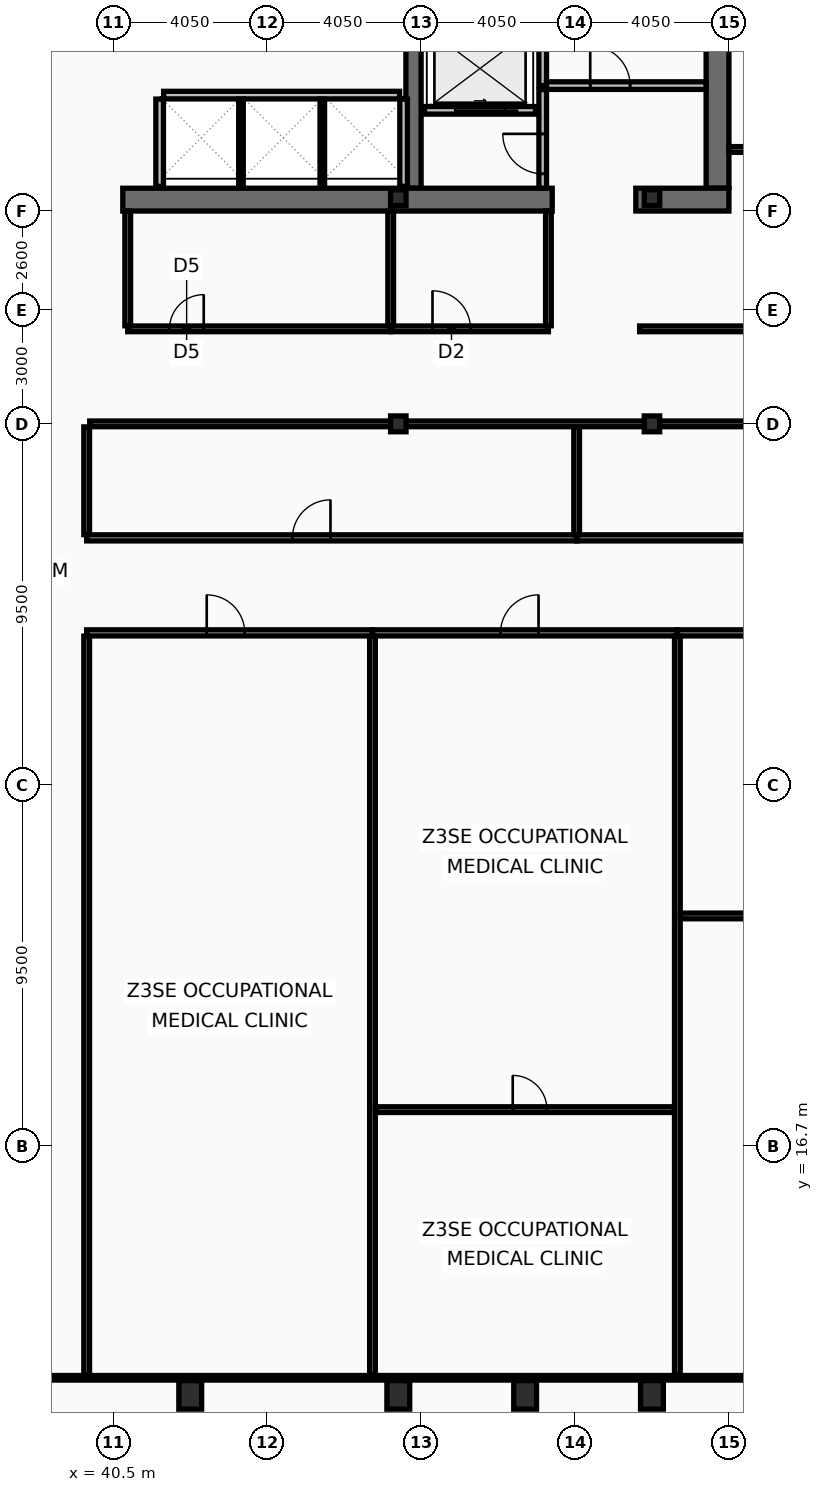
"""IFC4 building model, lengths in metres.
Left out: names, types, materials, properties, quantities, classifications, styles, units other than length and angle.
Written with IfcOpenShell. Run it as: python <this file> out.ifc"""

import sys

from ifc_helpers import new_model, si_unit, direction, frame, frame_2d, origin, origin_2d, place, context, subcontext, project, spatial, rectangle, hollow_rectangle, i_section, extrude, element, fill, save


model = new_model("IFC4")
c1 = context("Model", 3, precision=1e-05, world=origin(), true_north=direction((0.0, 1.0)))
c2 = subcontext(c1, "Body", "Model", "MODEL_VIEW")
j1 = project(units=[si_unit("LENGTHUNIT", "METRE"), si_unit("PLANEANGLEUNIT", "RADIAN")], contexts=[c1])
p1 = place(None, origin())
s1 = spatial("IfcSite", under=j1, at=p1, CompositionType="ELEMENT")
p2 = place(p1, origin())
s2 = spatial("IfcBuilding", under=s1, at=p2, CompositionType="ELEMENT")
p3 = place(p2, frame((0.0, 0.0, 221.0)))
s3 = spatial("IfcBuildingStorey", under=s2, at=p3, CompositionType="ELEMENT", Elevation=221.0)
p4 = place(p3, frame((56.4, 53.1, 0.0), z_axis=(0.0, 0.0, 1.0), x_axis=(0.0, -1.0, 0.0)))
e1 = element("IfcWall", 1, at=p4, inside=s3, PredefinedType="SHEAR", context=c2, shape_type="SweptSolid", body=[
    extrude(rectangle(XDim=11.2, YDim=0.6, at=frame_2d((5.6, 0.0))), origin(), (0.0, 0.0, 1.0), 3.44),
])
p5 = place(p3, frame((48.4, 41.9, 0.0), z_axis=(0.0, 0.0, 1.0), x_axis=(0.0, 1.0, 0.0)))
e2 = element("IfcWall", 2, at=p5, inside=s3, PredefinedType="SHEAR", context=c2, shape_type="SweptSolid", body=[
    extrude(rectangle(XDim=11.2, YDim=0.4, at=frame_2d((5.6, 0.0))), origin(), (0.0, 0.0, 1.0), 3.44),
])
p6 = place(p3, frame((52.05, 41.6, 0.0), z_axis=(0.0, 0.0, 1.0), x_axis=(-1.0, 0.0, 0.0)))
e3 = element("IfcWall", 3, at=p6, inside=s3, PredefinedType="SHEAR", context=c2, shape_type="SweptSolid", body=[
    extrude(rectangle(XDim=11.3, YDim=0.6, at=frame_2d((5.65, 0.0))), origin(), (0.0, 0.0, 1.0), 3.44),
])
p7 = place(p3, frame((56.7, 41.6, 0.0), z_axis=(0.0, 0.0, 1.0), x_axis=(-1.0, 0.0, 0.0)))
e4 = element("IfcWall", 4, at=p7, inside=s3, PredefinedType="SHEAR", context=c2, shape_type="SweptSolid", body=[
    extrude(rectangle(XDim=2.45, YDim=0.6, at=frame_2d((1.225, 0.0))), origin(), (0.0, 0.0, 1.0), 3.44),
])
for number, where, z_axis, x_axis in (
    (5, (42.525, 10.15, 0.0), (0.0, 0.0, 1.0), (1.0, 0.0, 0.0)),
    (6, (48.0, 10.15, 0.0), (0.0, 0.0, 1.0), (1.0, 0.0, 0.0)),
    (7, (51.337, 10.15, 0.0), (0.0, 0.0, 1.0), (1.0, 0.0, 0.0)),
    (8, (54.675, 10.15, 0.0), (0.0, 0.0, 1.0), (1.0, 0.0, 0.0)),
):
    element("IfcColumn", number, at=place(p3, frame(where, z_axis=z_axis, x_axis=x_axis)), inside=s3, PredefinedType="COLUMN", context=c2, shape_type="SweptSolid", body=[
        extrude(hollow_rectangle(XDim=0.6, YDim=0.75, WallThickness=0.045, at=origin_2d()), origin(), (0.0, 0.0, 1.0), 3.6),
    ])
for number, where, z_axis, x_axis in (
    (9, (48.0, 35.7, 0.0), (0.0, 0.0, 1.0), (1.0, 0.0, 0.0)),
    (10, (48.0, 41.65, 0.0), (0.0, 0.0, 1.0), (1.0, 0.0, 0.0)),
    (11, (54.675, 35.7, 0.0), (0.0, 0.0, 1.0), (1.0, 0.0, 0.0)),
    (12, (54.675, 41.65, 0.0), (0.0, 0.0, 1.0), (1.0, 0.0, 0.0)),
):
    element("IfcColumn", number, at=place(p3, frame(where, z_axis=z_axis, x_axis=x_axis)), inside=s3, PredefinedType="COLUMN", context=c2, shape_type="SweptSolid", body=[
        extrude(i_section(OverallWidth=0.406, OverallDepth=0.416, WebThickness=0.03, FlangeThickness=0.048, at=origin_2d()), origin(), (0.0, 0.0, 1.0), 3.6),
    ])
p8 = place(p3, frame((51.61, 43.95, 0.0), z_axis=(0.0, 0.0, 1.0), x_axis=(-1.0, 0.0, 0.0)))
e13 = element("IfcWall", 13, at=p8, inside=s3, PredefinedType="PARTITIONING", context=c2, shape_type="SweptSolid", body=[
    extrude(rectangle(XDim=2.92, YDim=0.2, at=frame_2d((1.46, 0.0))), origin(), (0.0, 0.0, 1.0), 3.44),
])
p9 = place(p8, frame((0.81, 0.0, 0.0)))
e14 = element("IfcOpeningElement", 14, at=p9, cuts=e13, PredefinedType="OPENING", context=c2, shape_type="SweptSolid", body=[
    extrude(rectangle(XDim=1.3, YDim=2.18, at=frame_2d((0.65, 1.09))), frame((0.0, 0.11, 0.0), z_axis=(0.0, -1.0, 0.0), x_axis=(1.0, 0.0, 0.0)), (0.0, 0.0, 1.0), 0.22),
])
p10 = place(p3, frame((51.8, 44.6, 0.0), z_axis=(0.0, 0.0, 1.0), x_axis=(0.0, 1.0, 0.0)))
e15 = element("IfcWall", 15, at=p10, inside=s3, PredefinedType="PARTITIONING", context=c2, shape_type="SweptSolid", body=[
    extrude(rectangle(XDim=4.3, YDim=0.2, at=frame_2d((2.15, 0.0))), origin(), (0.0, 0.0, 1.0), 3.44),
])
p11 = place(p3, frame((51.9, 44.6, 0.0), z_axis=(0.0, 0.0, 1.0), x_axis=(1.0, 0.0, 0.0)))
e16 = element("IfcWall", 16, at=p11, inside=s3, PredefinedType="PARTITIONING", context=c2, shape_type="SweptSolid", body=[
    extrude(rectangle(XDim=4.2, YDim=0.2, at=frame_2d((2.1, 0.0))), origin(), (0.0, 0.0, 1.0), 3.44),
])
p12 = place(p11, frame((1.15, 0.0, 0.0)))
e17 = element("IfcOpeningElement", 17, at=p12, cuts=e16, PredefinedType="OPENING", context=c2, shape_type="SweptSolid", body=[
    extrude(rectangle(XDim=1.05, YDim=2.15, at=frame_2d((0.525, 1.075))), frame((0.0, 0.11, 0.0), z_axis=(0.0, -1.0, 0.0), x_axis=(1.0, 0.0, 0.0)), (0.0, 0.0, 1.0), 0.22),
])
p13 = place(p3, frame((51.8, 41.9, 0.0), z_axis=(0.0, 0.0, 1.0), x_axis=(0.0, 1.0, 0.0)))
e18 = element("IfcWall", 18, at=p13, inside=s3, PredefinedType="PARTITIONING", context=c2, shape_type="SweptSolid", body=[
    extrude(rectangle(XDim=2.595, YDim=0.2, at=frame_2d((1.298, 0.0))), origin(), (0.0, 0.0, 1.0), 3.44),
])
p14 = place(p13, frame((0.38, 0.0, 0.0)))
e19 = element("IfcOpeningElement", 19, at=p14, cuts=e18, PredefinedType="OPENING", context=c2, shape_type="SweptSolid", body=[
    extrude(rectangle(XDim=1.05, YDim=2.15, at=frame_2d((0.525, 1.075))), frame((0.0, 0.11, 0.0), z_axis=(0.0, -1.0, 0.0), x_axis=(1.0, 0.0, 0.0)), (0.0, 0.0, 1.0), 0.22),
])
p15 = place(p3, frame((41.825, 44.35, 0.0), z_axis=(0.0, 0.0, 1.0), x_axis=(1.0, 0.0, 0.0)))
e20 = element("IfcWall", 20, at=p15, inside=s3, PredefinedType="PARTITIONING", context=c2, shape_type="SweptSolid", body=[
    extrude(rectangle(XDim=6.21, YDim=0.2, at=frame_2d((3.105, 0.0))), origin(), (0.0, 0.0, 1.0), 3.44),
])
for number, where, z_axis, x_axis in (
    (21, (41.72, 41.95, 0.0), (0.0, 0.0, 1.0), (0.0, 1.0, 0.0)),
    (22, (48.14, 41.95, 0.0), (0.0, 0.0, 1.0), (0.0, 1.0, 0.0)),
):
    element("IfcWall", number, at=place(p3, frame(where, z_axis=z_axis, x_axis=x_axis)), inside=s3, PredefinedType="PARTITIONING", context=c2, shape_type="SweptSolid", body=[
        extrude(rectangle(XDim=2.295, YDim=0.2, at=frame_2d((1.147, 0.0))), origin(), (0.0, 0.0, 1.0), 3.44),
    ])
for number, where, z_axis, x_axis in (
    (23, (43.86, 41.95, 0.0), (0.0, 0.0, 1.0), (0.0, 1.0, 0.0)),
    (24, (46.0, 41.95, 0.0), (0.0, 0.0, 1.0), (0.0, 1.0, 0.0)),
):
    element("IfcWall", number, at=place(p3, frame(where, z_axis=z_axis, x_axis=x_axis)), inside=s3, PredefinedType="PARTITIONING", context=c2, shape_type="SweptSolid", body=[
        extrude(rectangle(XDim=2.295, YDim=0.12, at=frame_2d((1.147, 0.0))), origin(), (0.0, 0.0, 1.0), 3.44),
    ])
p16 = place(p3, frame((40.88, 38.2, 0.0), z_axis=(0.0, 0.0, 1.0), x_axis=(1.0, 0.0, 0.0)))
e25 = element("IfcWall", 25, at=p16, inside=s3, PredefinedType="PARTITIONING", context=c2, shape_type="SweptSolid", body=[
    extrude(rectangle(XDim=6.92, YDim=0.15, at=frame_2d((3.46, 0.0))), origin(), (0.0, 0.0, 1.0), 2.78),
])
p17 = place(p16, frame((1.1, 0.0, 0.0)))
e26 = element("IfcOpeningElement", 26, at=p17, cuts=e25, PredefinedType="OPENING", context=c2, shape_type="SweptSolid", body=[
    extrude(rectangle(XDim=0.9, YDim=2.05, at=frame_2d((0.45, 1.025))), frame((0.0, 0.085, 0.0), z_axis=(0.0, -1.0, 0.0), x_axis=(1.0, 0.0, 0.0)), (0.0, 0.0, 1.0), 0.17),
])
p18 = place(p3, frame((47.8, 38.2, 0.0), z_axis=(0.0, 0.0, 1.0), x_axis=(1.0, 0.0, 0.0)))
e27 = element("IfcWall", 27, at=p18, inside=s3, PredefinedType="PARTITIONING", context=c2, shape_type="SweptSolid", body=[
    extrude(rectangle(XDim=4.15, YDim=0.15, at=frame_2d((2.075, 0.0))), origin(), (0.0, 0.0, 1.0), 2.78),
])
p19 = place(p18, frame((1.1, 0.0, 0.0)))
e28 = element("IfcOpeningElement", 28, at=p19, cuts=e27, PredefinedType="OPENING", context=c2, shape_type="SweptSolid", body=[
    extrude(rectangle(XDim=1.0, YDim=2.05, at=frame_2d((0.5, 1.025))), frame((0.0, 0.085, 0.0), z_axis=(0.0, -1.0, 0.0), x_axis=(1.0, 0.0, 0.0)), (0.0, 0.0, 1.0), 0.17),
])
p20 = place(p3, frame((40.88, 38.28, 0.0), z_axis=(0.0, 0.0, 1.0), x_axis=(0.0, 1.0, 0.0)))
e29 = element("IfcWall", 29, at=p20, inside=s3, PredefinedType="PARTITIONING", context=c2, shape_type="SweptSolid", body=[
    extrude(rectangle(XDim=3.02, YDim=0.15, at=frame_2d((1.51, 0.0))), origin(), (0.0, 0.0, 1.0), 3.44),
])
p21 = place(p3, frame((47.8, 38.28, 0.0), z_axis=(0.0, 0.0, 1.0), x_axis=(0.0, 1.0, 0.0)))
e30 = element("IfcWall", 30, at=p21, inside=s3, PredefinedType="PARTITIONING", context=c2, shape_type="SweptSolid", body=[
    extrude(rectangle(XDim=3.02, YDim=0.15, at=frame_2d((1.51, 0.0))), origin(), (0.0, 0.0, 1.0), 2.78),
])
p22 = place(p3, frame((51.95, 38.28, 0.0), z_axis=(0.0, 0.0, 1.0), x_axis=(0.0, 1.0, 0.0)))
e31 = element("IfcWall", 31, at=p22, inside=s3, PredefinedType="PARTITIONING", context=c2, shape_type="SweptSolid", body=[
    extrude(rectangle(XDim=3.02, YDim=0.15, at=frame_2d((1.51, 0.0))), origin(), (0.0, 0.0, 1.0), 3.44),
])
p23 = place(p3, frame((54.35, 38.2, 0.0), z_axis=(0.0, 0.0, 1.0), x_axis=(1.0, 0.0, 0.0)))
e32 = element("IfcWall", 32, at=p23, inside=s3, PredefinedType="PARTITIONING", context=c2, shape_type="SweptSolid", body=[
    extrude(rectangle(XDim=10.52, YDim=0.15, at=frame_2d((5.26, 0.0))), origin(), (0.0, 0.0, 1.0), 2.78),
])
p24 = place(p23, frame((3.25, 0.0, 0.0)))
e33 = element("IfcOpeningElement", 33, at=p24, cuts=e32, PredefinedType="OPENING", context=c2, shape_type="SweptSolid", body=[
    extrude(rectangle(XDim=0.95, YDim=2.05, at=frame_2d((0.475, 1.025))), frame((0.0, 0.085, 0.0), z_axis=(0.0, -1.0, 0.0), x_axis=(1.0, 0.0, 0.0)), (0.0, 0.0, 1.0), 0.17),
])
p25 = place(p3, frame((56.7, 42.92, 0.0), z_axis=(0.0, 0.0, 1.0), x_axis=(1.0, 0.0, 0.0)))
e34 = element("IfcWall", 34, at=p25, inside=s3, PredefinedType="PARTITIONING", context=c2, shape_type="SweptSolid", body=[
    extrude(rectangle(XDim=8.105, YDim=0.15, at=frame_2d((4.052, 0.0))), origin(), (0.0, 0.0, 1.0), 2.78),
])
p26 = place(p25, frame((0.9, 0.0, 0.0)))
e35 = element("IfcOpeningElement", 35, at=p26, cuts=e34, PredefinedType="OPENING", context=c2, shape_type="SweptSolid", body=[
    extrude(rectangle(XDim=0.9, YDim=2.05, at=frame_2d((0.45, 1.025))), frame((0.0, 0.085, 0.0), z_axis=(0.0, -1.0, 0.0), x_axis=(1.0, 0.0, 0.0)), (0.0, 0.0, 1.0), 0.17),
])
p27 = place(p3, frame((39.8, 10.665, 0.0), z_axis=(0.0, 0.0, 1.0), x_axis=(0.0, 1.0, 0.0)))
e36 = element("IfcWall", 36, at=p27, inside=s3, PredefinedType="PARTITIONING", context=c2, shape_type="SweptSolid", body=[
    extrude(rectangle(XDim=19.45, YDim=0.15, at=frame_2d((9.725, 0.0))), origin(), (0.0, 0.0, 1.0), 2.98),
])
p28 = place(p3, frame((39.8, 32.785, 0.0), z_axis=(0.0, 0.0, 1.0), x_axis=(0.0, 1.0, 0.0)))
e37 = element("IfcWall", 37, at=p28, inside=s3, PredefinedType="PARTITIONING", context=c2, shape_type="SweptSolid", body=[
    extrude(rectangle(XDim=2.835, YDim=0.15, at=frame_2d((1.417, 0.0))), origin(), (0.0, 0.0, 1.0), 2.98),
])
p29 = place(p3, frame((39.88, 35.7, 0.0), z_axis=(0.0, 0.0, 1.0), x_axis=(1.0, 0.0, 0.0)))
e38 = element("IfcWall", 38, at=p29, inside=s3, PredefinedType="PARTITIONING", context=c2, shape_type="SweptSolid", body=[
    extrude(rectangle(XDim=24.925, YDim=0.15, at=frame_2d((12.462, 0.0))), origin(), (0.0, 0.0, 1.0), 2.78),
])
p30 = place(p3, frame((39.8, 30.2, 0.0), z_axis=(0.0, 0.0, 1.0), x_axis=(1.0, 0.0, 0.0)))
e39 = element("IfcWall", 39, at=p30, inside=s3, PredefinedType="PARTITIONING", context=c2, shape_type="SweptSolid", body=[
    extrude(rectangle(XDim=7.521, YDim=0.16, at=frame_2d((3.76, 0.0))), origin(), (0.0, 0.0, 1.0), 2.78),
])
p31 = place(p30, frame((3.159, 0.0, 0.0)))
e40 = element("IfcOpeningElement", 40, at=p31, cuts=e39, PredefinedType="OPENING", context=c2, shape_type="SweptSolid", body=[
    extrude(rectangle(XDim=1.0, YDim=2.05, at=frame_2d((0.5, 1.025))), frame((0.0, 0.09, 0.0), z_axis=(0.0, -1.0, 0.0), x_axis=(1.0, 0.0, 0.0)), (0.0, 0.0, 1.0), 0.18),
])
p32 = place(p3, frame((47.321, 30.2, 0.0), z_axis=(0.0, 0.0, 1.0), x_axis=(1.0, 0.0, 0.0)))
e41 = element("IfcWall", 41, at=p32, inside=s3, PredefinedType="PARTITIONING", context=c2, shape_type="SweptSolid", body=[
    extrude(rectangle(XDim=8.022, YDim=0.16, at=frame_2d((4.011, 0.0))), origin(), (0.0, 0.0, 1.0), 2.78),
])
p33 = place(p32, frame((3.369, 0.0, 0.0)))
e42 = element("IfcOpeningElement", 42, at=p33, cuts=e41, PredefinedType="OPENING", context=c2, shape_type="SweptSolid", body=[
    extrude(rectangle(XDim=1.0, YDim=2.05, at=frame_2d((0.5, 1.025))), frame((0.0, 0.09, 0.0), z_axis=(0.0, -1.0, 0.0), x_axis=(1.0, 0.0, 0.0)), (0.0, 0.0, 1.0), 0.18),
])
p34 = place(p3, frame((47.321, 10.665, 0.0), z_axis=(0.0, 0.0, 1.0), x_axis=(0.0, 1.0, 0.0)))
e43 = element("IfcWall", 43, at=p34, inside=s3, PredefinedType="PARTITIONING", context=c2, shape_type="SweptSolid", body=[
    extrude(rectangle(XDim=19.45, YDim=0.15, at=frame_2d((9.725, 0.0))), origin(), (0.0, 0.0, 1.0), 2.98),
])
p35 = place(p3, frame((47.401, 17.656, 0.0), z_axis=(0.0, 0.0, 1.0), x_axis=(1.0, 0.0, 0.0)))
e44 = element("IfcWall", 44, at=p35, inside=s3, PredefinedType="PARTITIONING", context=c2, shape_type="SweptSolid", body=[
    extrude(rectangle(XDim=7.863, YDim=0.15, at=frame_2d((3.931, 0.0))), origin(), (0.0, 0.0, 1.0), 2.78),
])
p36 = place(p35, frame((3.61, 0.0, 0.0)))
e45 = element("IfcOpeningElement", 45, at=p36, cuts=e44, PredefinedType="OPENING", context=c2, shape_type="SweptSolid", body=[
    extrude(rectangle(XDim=0.9, YDim=2.05, at=frame_2d((0.45, 1.025))), frame((0.0, 0.085, 0.0), z_axis=(0.0, -1.0, 0.0), x_axis=(1.0, 0.0, 0.0)), (0.0, 0.0, 1.0), 0.17),
])
p37 = place(p3, frame((55.344, 30.2, 0.0), z_axis=(0.0, 0.0, 1.0), x_axis=(1.0, 0.0, 0.0)))
e46 = element("IfcWall", 46, at=p37, inside=s3, PredefinedType="PARTITIONING", context=c2, shape_type="SweptSolid", body=[
    extrude(rectangle(XDim=9.527, YDim=0.16, at=frame_2d((4.763, 0.0))), origin(), (0.0, 0.0, 1.0), 3.44),
])
p38 = place(p37, frame((4.001, 0.0, 0.0)))
e47 = element("IfcOpeningElement", 47, at=p38, cuts=e46, PredefinedType="OPENING", context=c2, shape_type="SweptSolid", body=[
    extrude(rectangle(XDim=1.0, YDim=2.05, at=frame_2d((0.5, 1.025))), frame((0.0, 0.09, 0.0), z_axis=(0.0, -1.0, 0.0), x_axis=(1.0, 0.0, 0.0)), (0.0, 0.0, 1.0), 0.18),
])
p39 = place(p3, frame((55.344, 10.665, 0.0), z_axis=(0.0, 0.0, 1.0), x_axis=(0.0, 1.0, 0.0)))
e48 = element("IfcWall", 48, at=p39, inside=s3, PredefinedType="PARTITIONING", context=c2, shape_type="SweptSolid", body=[
    extrude(rectangle(XDim=19.45, YDim=0.15, at=frame_2d((9.725, 0.0))), origin(), (0.0, 0.0, 1.0), 2.78),
])
p40 = place(p3, frame((55.423, 22.752, 0.0), z_axis=(0.0, 0.0, 1.0), x_axis=(1.0, 0.0, 0.0)))
e49 = element("IfcWall", 49, at=p40, inside=s3, PredefinedType="PARTITIONING", context=c2, shape_type="SweptSolid", body=[
    extrude(rectangle(XDim=9.382, YDim=0.15, at=frame_2d((4.691, 0.0))), origin(), (0.0, 0.0, 1.0), 3.44),
])
p41 = place(p40, frame((4.287, 0.0, 0.0)))
e50 = element("IfcOpeningElement", 50, at=p41, cuts=e49, PredefinedType="OPENING", context=c2, shape_type="SweptSolid", body=[
    extrude(rectangle(XDim=0.9, YDim=2.05, at=frame_2d((0.45, 1.025))), frame((0.0, 0.085, 0.0), z_axis=(0.0, -1.0, 0.0), x_axis=(1.0, 0.0, 0.0)), (0.0, 0.0, 1.0), 0.17),
])
p42 = place(p3, frame((39.8, 32.7, 0.0), z_axis=(0.0, 0.0, 1.0), x_axis=(1.0, 0.0, 0.0)))
e51 = element("IfcWall", 51, at=p42, inside=s3, PredefinedType="PARTITIONING", context=c2, shape_type="SweptSolid", body=[
    extrude(rectangle(XDim=12.893, YDim=0.16, at=frame_2d((6.447, 0.0))), origin(), (0.0, 0.0, 1.0), 2.78),
])
p43 = place(p42, frame((5.415, 0.0, 0.0)))
e52 = element("IfcOpeningElement", 52, at=p43, cuts=e51, PredefinedType="OPENING", context=c2, shape_type="SweptSolid", body=[
    extrude(rectangle(XDim=1.0, YDim=2.05, at=frame_2d((0.5, 1.025))), frame((0.0, 0.09, 0.0), z_axis=(0.0, -1.0, 0.0), x_axis=(1.0, 0.0, 0.0)), (0.0, 0.0, 1.0), 0.18),
])
p44 = place(p3, frame((52.693, 32.7, 0.0), z_axis=(0.0, 0.0, 1.0), x_axis=(1.0, 0.0, 0.0)))
e53 = element("IfcWall", 53, at=p44, inside=s3, PredefinedType="PARTITIONING", context=c2, shape_type="SweptSolid", body=[
    extrude(rectangle(XDim=12.177, YDim=0.16, at=frame_2d((6.088, 0.0))), origin(), (0.0, 0.0, 1.0), 2.78),
])
p45 = place(p44, frame((5.114, 0.0, 0.0)))
e54 = element("IfcOpeningElement", 54, at=p45, cuts=e53, PredefinedType="OPENING", context=c2, shape_type="SweptSolid", body=[
    extrude(rectangle(XDim=1.0, YDim=2.05, at=frame_2d((0.5, 1.025))), frame((0.0, 0.09, 0.0), z_axis=(0.0, -1.0, 0.0), x_axis=(1.0, 0.0, 0.0)), (0.0, 0.0, 1.0), 0.18),
])
p46 = place(p3, frame((52.693, 32.785, 0.0), z_axis=(0.0, 0.0, 1.0), x_axis=(0.0, 1.0, 0.0)))
e55 = element("IfcWall", 55, at=p46, inside=s3, PredefinedType="PARTITIONING", context=c2, shape_type="SweptSolid", body=[
    extrude(rectangle(XDim=2.835, YDim=0.15, at=frame_2d((1.417, 0.0))), origin(), (0.0, 0.0, 1.0), 2.98),
])
p47 = place(p3, frame((8.095, 10.6, 0.0), z_axis=(0.0, 0.0, 1.0), x_axis=(1.0, 0.0, 0.0)))
e56 = element("IfcWall", 56, at=p47, inside=s3, PredefinedType="PARTITIONING", context=c2, shape_type="SweptSolid", body=[
    extrude(rectangle(XDim=56.71, YDim=0.12, at=frame_2d((28.355, 0.0))), origin(), (0.0, 0.0, 1.0), 2.78),
])
p48 = place(p9, origin())
e57 = element("IfcDoor", 57, at=p48, inside=s3, OperationType="SLIDING_TO_LEFT", PredefinedType="DOOR", context=c2, shape_type="SweptSolid", body=[
    extrude(rectangle(XDim=1.3, YDim=2.18, at=frame_2d((0.65, 1.09))), frame((0.0, 0.025, 0.0), z_axis=(0.0, -1.0, 0.0), x_axis=(1.0, 0.0, 0.0)), (0.0, 0.0, 1.0), 0.05),
])
fill(e14, e57)
p49 = place(p12, origin())
e58 = element("IfcDoor", 58, at=p49, inside=s3, OperationType="SINGLE_SWING_LEFT", PredefinedType="DOOR", context=c2, shape_type="SweptSolid", body=[
    extrude(rectangle(XDim=1.05, YDim=2.15, at=frame_2d((0.525, 1.075))), frame((0.0, 0.025, 0.0), z_axis=(0.0, -1.0, 0.0), x_axis=(1.0, 0.0, 0.0)), (0.0, 0.0, 1.0), 0.05),
])
fill(e17, e58)
p50 = place(p14, origin())
e59 = element("IfcDoor", 59, at=p50, inside=s3, OperationType="SINGLE_SWING_RIGHT", PredefinedType="DOOR", context=c2, shape_type="SweptSolid", body=[
    extrude(rectangle(XDim=1.05, YDim=2.15, at=frame_2d((0.525, 1.075))), frame((0.0, 0.025, 0.0), z_axis=(0.0, -1.0, 0.0), x_axis=(1.0, 0.0, 0.0)), (0.0, 0.0, 1.0), 0.05),
])
fill(e19, e59)
p51 = place(p17, origin())
e60 = element("IfcDoor", 60, at=p51, inside=s3, OperationType="SINGLE_SWING_RIGHT", PredefinedType="DOOR", context=c2, shape_type="SweptSolid", body=[
    extrude(rectangle(XDim=0.9, YDim=2.05, at=frame_2d((0.45, 1.025))), frame((0.0, 0.025, 0.0), z_axis=(0.0, -1.0, 0.0), x_axis=(1.0, 0.0, 0.0)), (0.0, 0.0, 1.0), 0.05),
])
fill(e26, e60)
p52 = place(p19, origin())
e61 = element("IfcDoor", 61, at=p52, inside=s3, OperationType="SINGLE_SWING_LEFT", PredefinedType="DOOR", context=c2, shape_type="SweptSolid", body=[
    extrude(rectangle(XDim=1.0, YDim=2.05, at=frame_2d((0.5, 1.025))), frame((0.0, 0.025, 0.0), z_axis=(0.0, -1.0, 0.0), x_axis=(1.0, 0.0, 0.0)), (0.0, 0.0, 1.0), 0.05),
])
fill(e28, e61)
p53 = place(p31, origin())
e62 = element("IfcDoor", 62, at=p53, inside=s3, OperationType="SINGLE_SWING_LEFT", PredefinedType="DOOR", context=c2, shape_type="SweptSolid", body=[
    extrude(rectangle(XDim=1.0, YDim=2.05, at=frame_2d((0.5, 1.025))), frame((0.0, 0.025, 0.0), z_axis=(0.0, -1.0, 0.0), x_axis=(1.0, 0.0, 0.0)), (0.0, 0.0, 1.0), 0.05),
])
fill(e40, e62)
p54 = place(p33, origin())
e63 = element("IfcDoor", 63, at=p54, inside=s3, OperationType="SINGLE_SWING_RIGHT", PredefinedType="DOOR", context=c2, shape_type="SweptSolid", body=[
    extrude(rectangle(XDim=1.0, YDim=2.05, at=frame_2d((0.5, 1.025))), frame((0.0, 0.025, 0.0), z_axis=(0.0, -1.0, 0.0), x_axis=(1.0, 0.0, 0.0)), (0.0, 0.0, 1.0), 0.05),
])
fill(e42, e63)
p55 = place(p36, origin())
e64 = element("IfcDoor", 64, at=p55, inside=s3, OperationType="SINGLE_SWING_LEFT", PredefinedType="DOOR", context=c2, shape_type="SweptSolid", body=[
    extrude(rectangle(XDim=0.9, YDim=2.05, at=frame_2d((0.45, 1.025))), frame((0.0, 0.025, 0.0), z_axis=(0.0, -1.0, 0.0), x_axis=(1.0, 0.0, 0.0)), (0.0, 0.0, 1.0), 0.05),
])
fill(e45, e64)
p56 = place(p43, origin())
e65 = element("IfcDoor", 65, at=p56, inside=s3, OperationType="SINGLE_SWING_RIGHT", PredefinedType="DOOR", context=c2, shape_type="SweptSolid", body=[
    extrude(rectangle(XDim=1.0, YDim=2.05, at=frame_2d((0.5, 1.025))), frame((0.0, 0.025, 0.0), z_axis=(0.0, -1.0, 0.0), x_axis=(1.0, 0.0, 0.0)), (0.0, 0.0, 1.0), 0.05),
])
fill(e52, e65)
save(model, sys.argv[1])
